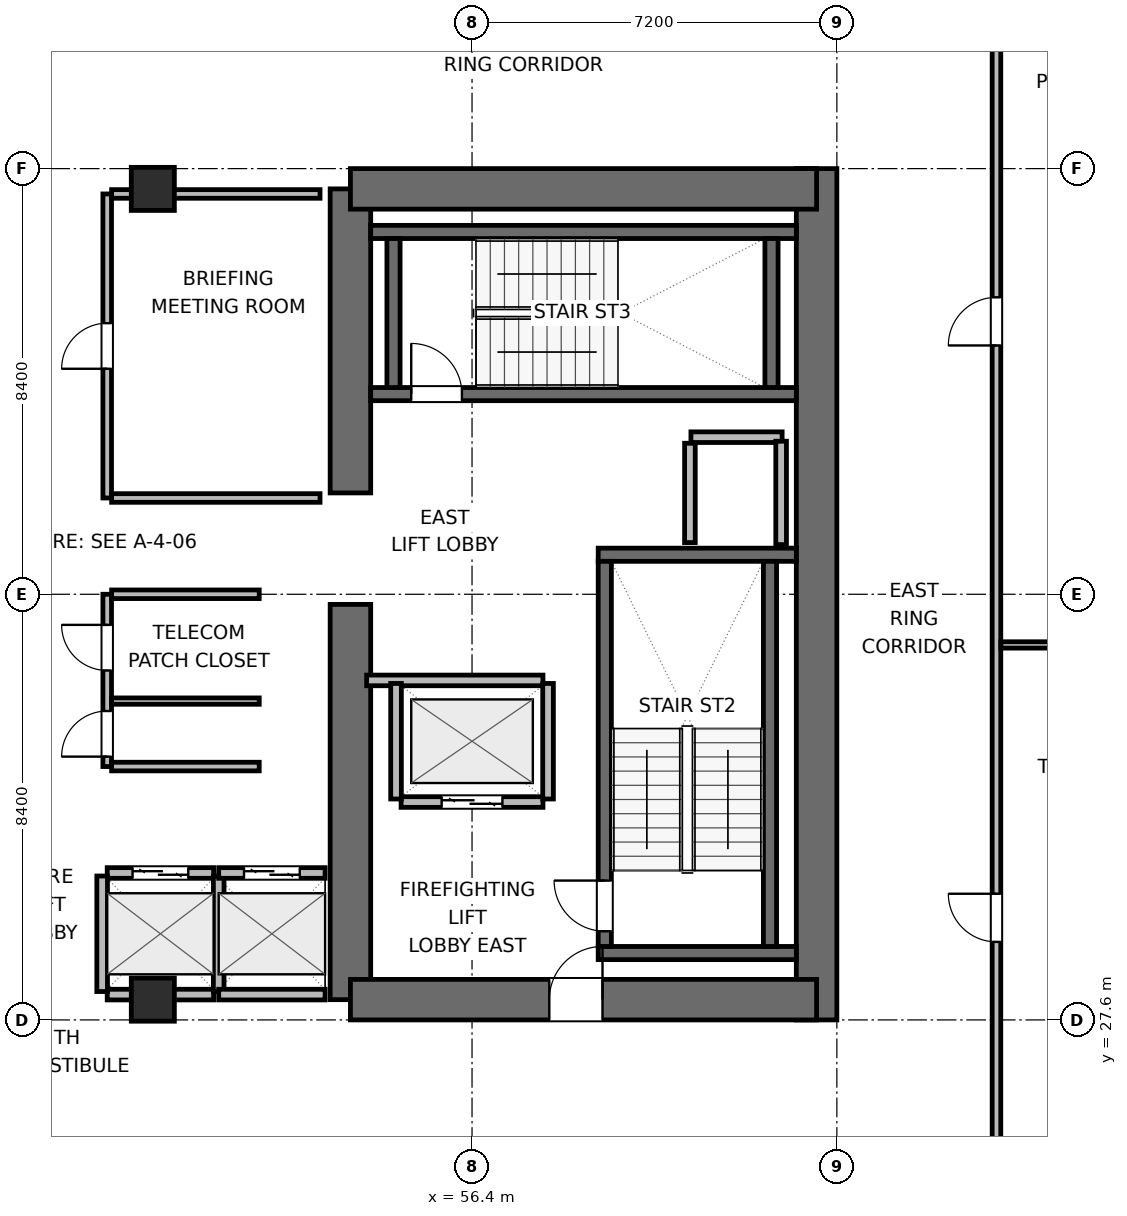
"""IFC4 building model, lengths in metres.
Left out: names, types, materials, properties, quantities, classifications, styles, units other than length and angle.
Written with IfcOpenShell. Run it as: python <this file> out.ifc"""

import sys

from ifc_helpers import new_model, si_unit, direction, frame, frame_2d, origin, origin_2d, place, context, subcontext, project, spatial, rectangle, extrude, element, fill, save


model = new_model("IFC4")
c1 = context("Model", 3, precision=1e-05, world=origin(), true_north=direction((0.0, 1.0)))
c2 = subcontext(c1, "Body", "Model", "MODEL_VIEW")
j1 = project(units=[si_unit("LENGTHUNIT", "METRE"), si_unit("PLANEANGLEUNIT", "RADIAN")], contexts=[c1])
p1 = place(None, origin())
s1 = spatial("IfcSite", under=j1, at=p1, CompositionType="ELEMENT")
p2 = place(p1, origin())
s2 = spatial("IfcBuilding", under=s1, at=p2, CompositionType="ELEMENT")
p3 = place(p2, frame((0.0, 0.0, 93.6)))
s3 = spatial("IfcBuildingStorey", under=s2, at=p3, CompositionType="ELEMENT", Elevation=93.6)
p4 = place(p3, frame((54.0, 28.0, 0.0), z_axis=(0.0, 0.0, 1.0), x_axis=(0.0, 1.0, 0.0)))
e1 = element("IfcWall", 1, at=p4, inside=s3, PredefinedType="SHEAR", context=c2, shape_type="SweptSolid", body=[
    extrude(rectangle(XDim=7.8, YDim=0.8, at=frame_2d((3.9, 0.0))), origin(), (0.0, 0.0, 1.0), 3.9),
])
p5 = place(p3, frame((54.0, 38.0, 0.0), z_axis=(0.0, 0.0, 1.0), x_axis=(0.0, 1.0, 0.0)))
e2 = element("IfcWall", 2, at=p5, inside=s3, PredefinedType="SHEAR", context=c2, shape_type="SweptSolid", body=[
    extrude(rectangle(XDim=6.0, YDim=0.8, at=frame_2d((3.0, 0.0))), origin(), (0.0, 0.0, 1.0), 3.9),
])
p6 = place(p3, frame((63.2, 27.6, 0.0), z_axis=(0.0, 0.0, 1.0), x_axis=(0.0, 1.0, 0.0)))
e3 = element("IfcWall", 3, at=p6, inside=s3, PredefinedType="SHEAR", context=c2, shape_type="SweptSolid", body=[
    extrude(rectangle(XDim=16.8, YDim=0.8, at=frame_2d((8.4, 0.0))), origin(), (0.0, 0.0, 1.0), 3.9),
])
p7 = place(p3, frame((54.0, 28.0, 0.0), z_axis=(0.0, 0.0, 1.0), x_axis=(1.0, 0.0, 0.0)))
e4 = element("IfcWall", 4, at=p7, inside=s3, PredefinedType="SHEAR", context=c2, shape_type="SweptSolid", body=[
    extrude(rectangle(XDim=9.2, YDim=0.8, at=frame_2d((4.6, 0.0))), origin(), (0.0, 0.0, 1.0), 3.9),
])
p8 = place(p7, frame((3.925, 0.0, 0.0)))
e5 = element("IfcOpeningElement", 5, at=p8, cuts=e4, PredefinedType="OPENING", context=c2, shape_type="SweptSolid", body=[
    extrude(rectangle(XDim=1.05, YDim=2.04, at=frame_2d((0.525, 1.02))), frame((0.0, 0.41, 0.0), z_axis=(0.0, -1.0, 0.0), x_axis=(1.0, 0.0, 0.0)), (0.0, 0.0, 1.0), 0.82),
])
p9 = place(p3, frame((54.0, 44.0, 0.0), z_axis=(0.0, 0.0, 1.0), x_axis=(1.0, 0.0, 0.0)))
e6 = element("IfcWall", 6, at=p9, inside=s3, PredefinedType="SHEAR", context=c2, shape_type="SweptSolid", body=[
    extrude(rectangle(XDim=9.2, YDim=0.8, at=frame_2d((4.6, 0.0))), origin(), (0.0, 0.0, 1.0), 3.9),
])
for number, where, z_axis, x_axis in (
    (7, (58.89, 28.92, 0.0), (0.0, 0.0, 1.0), (1.0, 0.0, 0.0)),
    (8, (58.89, 36.78, 0.0), (0.0, 0.0, 1.0), (1.0, 0.0, 0.0)),
):
    element("IfcWall", number, at=place(p3, frame(where, z_axis=z_axis, x_axis=x_axis)), inside=s3, PredefinedType="SHEAR", context=c2, shape_type="SweptSolid", body=[
        extrude(rectangle(XDim=3.91, YDim=0.26, at=frame_2d((1.955, 0.0))), origin(), (0.0, 0.0, 1.0), 3.9),
    ])
p10 = place(p3, frame((59.02, 29.05, 0.0), z_axis=(0.0, 0.0, 1.0), x_axis=(0.0, 1.0, 0.0)))
e9 = element("IfcWall", 9, at=p10, inside=s3, PredefinedType="SHEAR", context=c2, shape_type="SweptSolid", body=[
    extrude(rectangle(XDim=7.6, YDim=0.26, at=frame_2d((3.8, 0.0))), origin(), (0.0, 0.0, 1.0), 3.9),
])
p11 = place(p10, frame((0.3, 0.0, 0.0)))
e10 = element("IfcOpeningElement", 10, at=p11, cuts=e9, PredefinedType="OPENING", context=c2, shape_type="SweptSolid", body=[
    extrude(rectangle(XDim=1.0, YDim=2.04, at=frame_2d((0.5, 1.02))), frame((0.0, 0.14, 0.0), z_axis=(0.0, -1.0, 0.0), x_axis=(1.0, 0.0, 0.0)), (0.0, 0.0, 1.0), 0.28),
])
p12 = place(p3, frame((62.28, 29.05, 0.0), z_axis=(0.0, 0.0, 1.0), x_axis=(0.0, 1.0, 0.0)))
e11 = element("IfcWall", 11, at=p12, inside=s3, PredefinedType="SHEAR", context=c2, shape_type="SweptSolid", body=[
    extrude(rectangle(XDim=7.6, YDim=0.26, at=frame_2d((3.8, 0.0))), origin(), (0.0, 0.0, 1.0), 3.9),
])
p13 = place(p3, frame((54.4, 39.95, 0.0), z_axis=(0.0, 0.0, 1.0), x_axis=(1.0, 0.0, 0.0)))
e12 = element("IfcWall", 12, at=p13, inside=s3, PredefinedType="SHEAR", context=c2, shape_type="SweptSolid", body=[
    extrude(rectangle(XDim=8.4, YDim=0.26, at=frame_2d((4.2, 0.0))), origin(), (0.0, 0.0, 1.0), 3.9),
])
p14 = place(p13, frame((0.8, 0.0, 0.0)))
e13 = element("IfcOpeningElement", 13, at=p14, cuts=e12, PredefinedType="OPENING", context=c2, shape_type="SweptSolid", body=[
    extrude(rectangle(XDim=1.0, YDim=2.04, at=frame_2d((0.5, 1.02))), frame((0.0, 0.14, 0.0), z_axis=(0.0, -1.0, 0.0), x_axis=(1.0, 0.0, 0.0)), (0.0, 0.0, 1.0), 0.28),
])
p15 = place(p3, frame((54.4, 43.15, 0.0), z_axis=(0.0, 0.0, 1.0), x_axis=(1.0, 0.0, 0.0)))
e14 = element("IfcWall", 14, at=p15, inside=s3, PredefinedType="SHEAR", context=c2, shape_type="SweptSolid", body=[
    extrude(rectangle(XDim=8.4, YDim=0.26, at=frame_2d((4.2, 0.0))), origin(), (0.0, 0.0, 1.0), 3.9),
])
for number, where, z_axis, x_axis in (
    (15, (54.85, 40.08, 0.0), (0.0, 0.0, 1.0), (0.0, 1.0, 0.0)),
    (16, (62.31, 40.08, 0.0), (0.0, 0.0, 1.0), (0.0, 1.0, 0.0)),
):
    element("IfcWall", number, at=place(p3, frame(where, z_axis=z_axis, x_axis=x_axis)), inside=s3, PredefinedType="SHEAR", context=c2, shape_type="SweptSolid", body=[
        extrude(rectangle(XDim=2.94, YDim=0.26, at=frame_2d((1.47, 0.0))), origin(), (0.0, 0.0, 1.0), 3.9),
    ])
for number, where, z_axis, x_axis in (
    (17, (50.1, 28.0, 0.0), (0.0, 0.0, 1.0), (1.0, 0.0, 0.0)),
    (18, (50.1, 44.0, 0.0), (0.0, 0.0, 1.0), (1.0, 0.0, 0.0)),
):
    element("IfcColumn", number, at=place(p3, frame(where, z_axis=z_axis, x_axis=x_axis)), inside=s3, PredefinedType="COLUMN", context=c2, shape_type="SweptSolid", body=[
        extrude(rectangle(XDim=0.85, YDim=0.85, at=origin_2d()), origin(), (0.0, 0.0, 1.0), 3.9),
    ])
p16 = place(p3, frame((60.72, 39.1, 0.0), z_axis=(0.0, 0.0, 1.0), x_axis=(1.0, 0.0, 0.0)))
e19 = element("IfcWall", 19, at=p16, inside=s3, PredefinedType="PARTITIONING", context=c2, shape_type="SweptSolid", body=[
    extrude(rectangle(XDim=1.8, YDim=0.21, at=frame_2d((0.9, 0.0))), origin(), (0.0, 0.0, 1.0), 3.64),
])
p17 = place(p3, frame((60.7, 37.02, 0.0), z_axis=(0.0, 0.0, 1.0), x_axis=(0.0, 1.0, 0.0)))
e20 = element("IfcWall", 20, at=p17, inside=s3, PredefinedType="PARTITIONING", context=c2, shape_type="SweptSolid", body=[
    extrude(rectangle(XDim=1.96, YDim=0.21, at=frame_2d((0.98, 0.0))), origin(), (0.0, 0.0, 1.0), 3.64),
])
p18 = place(p3, frame((62.5, 36.98, 0.0), z_axis=(0.0, 0.0, 1.0), x_axis=(0.0, 1.0, 0.0)))
e21 = element("IfcWall", 21, at=p18, inside=s3, PredefinedType="PARTITIONING", context=c2, shape_type="SweptSolid", body=[
    extrude(rectangle(XDim=2.04, YDim=0.21, at=frame_2d((1.02, 0.0))), origin(), (0.0, 0.0, 1.0), 3.64),
])
p19 = place(p3, frame((55.0, 31.9, 0.0), z_axis=(0.0, 0.0, 1.0), x_axis=(1.0, 0.0, 0.0)))
e22 = element("IfcWall", 22, at=p19, inside=s3, PredefinedType="PARTITIONING", context=c2, shape_type="SweptSolid", body=[
    extrude(rectangle(XDim=2.8, YDim=0.21, at=frame_2d((1.4, 0.0))), origin(), (0.0, 0.0, 1.0), 3.64),
])
p20 = place(p19, frame((0.8, 0.0, 0.0)))
e23 = element("IfcOpeningElement", 23, at=p20, cuts=e22, PredefinedType="OPENING", context=c2, shape_type="SweptSolid", body=[
    extrude(rectangle(XDim=1.2, YDim=2.04, at=frame_2d((0.6, 1.02))), frame((0.0, 0.115, 0.0), z_axis=(0.0, -1.0, 0.0), x_axis=(1.0, 0.0, 0.0)), (0.0, 0.0, 1.0), 0.23),
])
p21 = place(p3, frame((54.32, 34.3, 0.0), z_axis=(0.0, 0.0, 1.0), x_axis=(1.0, 0.0, 0.0)))
e24 = element("IfcWall", 24, at=p21, inside=s3, PredefinedType="PARTITIONING", context=c2, shape_type="SweptSolid", body=[
    extrude(rectangle(XDim=3.48, YDim=0.21, at=frame_2d((1.74, 0.0))), origin(), (0.0, 0.0, 1.0), 3.64),
])
for number, where, z_axis, x_axis in (
    (25, (54.9, 31.96, 0.0), (0.0, 0.0, 1.0), (0.0, 1.0, 0.0)),
    (26, (57.9, 31.96, 0.0), (0.0, 0.0, 1.0), (0.0, 1.0, 0.0)),
):
    element("IfcWall", number, at=place(p3, frame(where, z_axis=z_axis, x_axis=x_axis)), inside=s3, PredefinedType="PARTITIONING", context=c2, shape_type="SweptSolid", body=[
        extrude(rectangle(XDim=2.28, YDim=0.21, at=frame_2d((1.14, 0.0))), origin(), (0.0, 0.0, 1.0), 3.64),
    ])
p22 = place(p3, frame((49.2, 30.5, 0.0), z_axis=(0.0, 0.0, 1.0), x_axis=(1.0, 0.0, 0.0)))
e27 = element("IfcWall", 27, at=p22, inside=s3, PredefinedType="PARTITIONING", context=c2, shape_type="SweptSolid", body=[
    extrude(rectangle(XDim=2.1, YDim=0.21, at=frame_2d((1.05, 0.0))), origin(), (0.0, 0.0, 1.0), 3.64),
])
p23 = place(p22, frame((0.5, 0.0, 0.0)))
e28 = element("IfcOpeningElement", 28, at=p23, cuts=e27, PredefinedType="OPENING", context=c2, shape_type="SweptSolid", body=[
    extrude(rectangle(XDim=1.1, YDim=2.04, at=frame_2d((0.55, 1.02))), frame((0.0, 0.115, 0.0), z_axis=(0.0, -1.0, 0.0), x_axis=(1.0, 0.0, 0.0)), (0.0, 0.0, 1.0), 0.23),
])
p24 = place(p3, frame((49.2, 28.1, 0.0), z_axis=(0.0, 0.0, 1.0), x_axis=(1.0, 0.0, 0.0)))
e29 = element("IfcWall", 29, at=p24, inside=s3, PredefinedType="PARTITIONING", context=c2, shape_type="SweptSolid", body=[
    extrude(rectangle(XDim=2.1, YDim=0.21, at=frame_2d((1.05, 0.0))), origin(), (0.0, 0.0, 1.0), 2.525),
])
for number, where, z_axis, x_axis in (
    (30, (49.1, 28.16, 0.0), (0.0, 0.0, 1.0), (0.0, 1.0, 0.0)),
    (31, (51.4, 28.16, 0.0), (0.0, 0.0, 1.0), (0.0, 1.0, 0.0)),
):
    element("IfcWall", number, at=place(p3, frame(where, z_axis=z_axis, x_axis=x_axis)), inside=s3, PredefinedType="PARTITIONING", context=c2, shape_type="SweptSolid", body=[
        extrude(rectangle(XDim=2.28, YDim=0.21, at=frame_2d((1.14, 0.0))), origin(), (0.0, 0.0, 1.0), 3.64),
    ])
p25 = place(p3, frame((51.4, 30.5, 0.0), z_axis=(0.0, 0.0, 1.0), x_axis=(1.0, 0.0, 0.0)))
e32 = element("IfcWall", 32, at=p25, inside=s3, PredefinedType="PARTITIONING", context=c2, shape_type="SweptSolid", body=[
    extrude(rectangle(XDim=2.1, YDim=0.21, at=frame_2d((1.05, 0.0))), origin(), (0.0, 0.0, 1.0), 3.64),
])
p26 = place(p25, frame((0.5, 0.0, 0.0)))
e33 = element("IfcOpeningElement", 33, at=p26, cuts=e32, PredefinedType="OPENING", context=c2, shape_type="SweptSolid", body=[
    extrude(rectangle(XDim=1.1, YDim=2.04, at=frame_2d((0.55, 1.02))), frame((0.0, 0.115, 0.0), z_axis=(0.0, -1.0, 0.0), x_axis=(1.0, 0.0, 0.0)), (0.0, 0.0, 1.0), 0.23),
])
p27 = place(p3, frame((51.4, 28.1, 0.0), z_axis=(0.0, 0.0, 1.0), x_axis=(1.0, 0.0, 0.0)))
e34 = element("IfcWall", 34, at=p27, inside=s3, PredefinedType="PARTITIONING", context=c2, shape_type="SweptSolid", body=[
    extrude(rectangle(XDim=2.1, YDim=0.21, at=frame_2d((1.05, 0.0))), origin(), (0.0, 0.0, 1.0), 2.525),
])
p28 = place(p3, frame((49.2, 32.6, 0.0), z_axis=(0.0, 0.0, 1.0), x_axis=(0.0, 1.0, 0.0)))
e35 = element("IfcWall", 35, at=p28, inside=s3, PredefinedType="PARTITIONING", context=c2, shape_type="SweptSolid", body=[
    extrude(rectangle(XDim=3.4, YDim=0.17, at=frame_2d((1.7, 0.0))), origin(), (0.0, 0.0, 1.0), 3.64),
])
p29 = place(p28, frame((0.196, 0.0, 0.0)))
e36 = element("IfcOpeningElement", 36, at=p29, cuts=e35, PredefinedType="OPENING", context=c2, shape_type="SweptSolid", body=[
    extrude(rectangle(XDim=0.9, YDim=2.02, at=frame_2d((0.45, 1.01))), frame((0.0, 0.095, 0.0), z_axis=(0.0, -1.0, 0.0), x_axis=(1.0, 0.0, 0.0)), (0.0, 0.0, 1.0), 0.19),
])
p30 = place(p28, frame((1.896, 0.0, 0.0)))
e37 = element("IfcOpeningElement", 37, at=p30, cuts=e35, PredefinedType="OPENING", context=c2, shape_type="SweptSolid", body=[
    extrude(rectangle(XDim=0.9, YDim=2.02, at=frame_2d((0.45, 1.01))), frame((0.0, 0.095, 0.0), z_axis=(0.0, -1.0, 0.0), x_axis=(1.0, 0.0, 0.0)), (0.0, 0.0, 1.0), 0.19),
])
for number, where, z_axis, x_axis in (
    (38, (49.287, 32.6, 0.0), (0.0, 0.0, 1.0), (1.0, 0.0, 0.0)),
    (39, (49.287, 36.0, 0.0), (0.0, 0.0, 1.0), (1.0, 0.0, 0.0)),
):
    element("IfcWall", number, at=place(p3, frame(where, z_axis=z_axis, x_axis=x_axis)), inside=s3, PredefinedType="PARTITIONING", context=c2, shape_type="SweptSolid", body=[
        extrude(rectangle(XDim=2.913, YDim=0.17, at=frame_2d((1.457, 0.0))), origin(), (0.0, 0.0, 1.0), 3.64),
    ])
p31 = place(p3, frame((49.287, 33.892, 0.0), z_axis=(0.0, 0.0, 1.0), x_axis=(1.0, 0.0, 0.0)))
e40 = element("IfcWall", 40, at=p31, inside=s3, PredefinedType="PARTITIONING", context=c2, shape_type="SweptSolid", body=[
    extrude(rectangle(XDim=2.913, YDim=0.125, at=frame_2d((1.457, 0.0))), origin(), (0.0, 0.0, 1.0), 3.64),
])
p32 = place(p3, frame((49.2, 37.9, 0.0), z_axis=(0.0, 0.0, 1.0), x_axis=(0.0, 1.0, 0.0)))
e41 = element("IfcWall", 41, at=p32, inside=s3, PredefinedType="PARTITIONING", context=c2, shape_type="SweptSolid", body=[
    extrude(rectangle(XDim=6.0, YDim=0.17, at=frame_2d((3.0, 0.0))), origin(), (0.0, 0.0, 1.0), 3.64),
])
p33 = place(p32, frame((2.55, 0.0, 0.0)))
e42 = element("IfcOpeningElement", 42, at=p33, cuts=e41, PredefinedType="OPENING", context=c2, shape_type="SweptSolid", body=[
    extrude(rectangle(XDim=0.9, YDim=2.02, at=frame_2d((0.45, 1.01))), frame((0.0, 0.095, 0.0), z_axis=(0.0, -1.0, 0.0), x_axis=(1.0, 0.0, 0.0)), (0.0, 0.0, 1.0), 0.19),
])
p34 = place(p3, frame((49.287, 37.9, 0.0), z_axis=(0.0, 0.0, 1.0), x_axis=(1.0, 0.0, 0.0)))
e43 = element("IfcWall", 43, at=p34, inside=s3, PredefinedType="PARTITIONING", context=c2, shape_type="SweptSolid", body=[
    extrude(rectangle(XDim=4.113, YDim=0.17, at=frame_2d((2.056, 0.0))), origin(), (0.0, 0.0, 1.0), 3.64),
])
p35 = place(p3, frame((49.287, 43.9, 0.0), z_axis=(0.0, 0.0, 1.0), x_axis=(1.0, 0.0, 0.0)))
e44 = element("IfcWall", 44, at=p35, inside=s3, PredefinedType="PARTITIONING", context=c2, shape_type="SweptSolid", body=[
    extrude(rectangle(XDim=4.113, YDim=0.17, at=frame_2d((2.056, 0.0))), origin(), (0.0, 0.0, 1.0), 2.525),
])
p36 = place(p3, frame((66.75, 24.317, 0.0), z_axis=(0.0, 0.0, 1.0), x_axis=(0.0, 1.0, 0.0)))
e45 = element("IfcWall", 45, at=p36, inside=s3, PredefinedType="PARTITIONING", context=c2, shape_type="SweptSolid", body=[
    extrude(rectangle(XDim=23.366, YDim=0.17, at=frame_2d((11.683, 0.0))), origin(), (0.0, 0.0, 1.0), 3.64),
])
p37 = place(p36, frame((4.823, 0.0, 0.0)))
e46 = element("IfcOpeningElement", 46, at=p37, cuts=e45, PredefinedType="OPENING", context=c2, shape_type="SweptSolid", body=[
    extrude(rectangle(XDim=0.95, YDim=2.04, at=frame_2d((0.475, 1.02))), frame((0.0, 0.095, 0.0), z_axis=(0.0, -1.0, 0.0), x_axis=(1.0, 0.0, 0.0)), (0.0, 0.0, 1.0), 0.19),
])
p38 = place(p36, frame((16.593, 0.0, 0.0)))
e47 = element("IfcOpeningElement", 47, at=p38, cuts=e45, PredefinedType="OPENING", context=c2, shape_type="SweptSolid", body=[
    extrude(rectangle(XDim=0.95, YDim=2.04, at=frame_2d((0.475, 1.02))), frame((0.0, 0.095, 0.0), z_axis=(0.0, -1.0, 0.0), x_axis=(1.0, 0.0, 0.0)), (0.0, 0.0, 1.0), 0.19),
])
p39 = place(p3, frame((66.837, 35.0, 0.0), z_axis=(0.0, 0.0, 1.0), x_axis=(1.0, 0.0, 0.0)))
e48 = element("IfcWall", 48, at=p39, inside=s3, PredefinedType="PARTITIONING", context=c2, shape_type="SweptSolid", body=[
    extrude(rectangle(XDim=3.718, YDim=0.125, at=frame_2d((1.859, 0.0))), origin(), (0.0, 0.0, 1.0), 3.64),
])
p40 = place(p11, origin())
e49 = element("IfcDoor", 49, at=p40, inside=s3, OperationType="SINGLE_SWING_RIGHT", PredefinedType="DOOR", context=c2, shape_type="SweptSolid", body=[
    extrude(rectangle(XDim=1.0, YDim=2.04, at=frame_2d((0.5, 1.02))), frame((0.0, 0.025, 0.0), z_axis=(0.0, -1.0, 0.0), x_axis=(1.0, 0.0, 0.0)), (0.0, 0.0, 1.0), 0.05),
])
fill(e10, e49)
p41 = place(p14, origin())
e50 = element("IfcDoor", 50, at=p41, inside=s3, OperationType="SINGLE_SWING_LEFT", PredefinedType="DOOR", context=c2, shape_type="SweptSolid", body=[
    extrude(rectangle(XDim=1.0, YDim=2.04, at=frame_2d((0.5, 1.02))), frame((0.0, 0.025, 0.0), z_axis=(0.0, -1.0, 0.0), x_axis=(1.0, 0.0, 0.0)), (0.0, 0.0, 1.0), 0.05),
])
fill(e13, e50)
p42 = place(p20, origin())
e51 = element("IfcDoor", 51, at=p42, inside=s3, OperationType="DOUBLE_DOOR_SLIDING", PredefinedType="DOOR", context=c2, shape_type="SweptSolid", body=[
    extrude(rectangle(XDim=1.2, YDim=2.04, at=frame_2d((0.6, 1.02))), frame((0.0, 0.025, 0.0), z_axis=(0.0, -1.0, 0.0), x_axis=(1.0, 0.0, 0.0)), (0.0, 0.0, 1.0), 0.05),
])
fill(e23, e51)
p43 = place(p23, origin())
e52 = element("IfcDoor", 52, at=p43, inside=s3, OperationType="DOUBLE_DOOR_SLIDING", PredefinedType="DOOR", context=c2, shape_type="SweptSolid", body=[
    extrude(rectangle(XDim=1.1, YDim=2.04, at=frame_2d((0.55, 1.02))), frame((0.0, 0.025, 0.0), z_axis=(0.0, -1.0, 0.0), x_axis=(1.0, 0.0, 0.0)), (0.0, 0.0, 1.0), 0.05),
])
fill(e28, e52)
p44 = place(p26, origin())
e53 = element("IfcDoor", 53, at=p44, inside=s3, OperationType="DOUBLE_DOOR_SLIDING", PredefinedType="DOOR", context=c2, shape_type="SweptSolid", body=[
    extrude(rectangle(XDim=1.1, YDim=2.04, at=frame_2d((0.55, 1.02))), frame((0.0, 0.025, 0.0), z_axis=(0.0, -1.0, 0.0), x_axis=(1.0, 0.0, 0.0)), (0.0, 0.0, 1.0), 0.05),
])
fill(e33, e53)
p45 = place(p8, origin())
e54 = element("IfcDoor", 54, at=p45, inside=s3, OperationType="SINGLE_SWING_RIGHT", PredefinedType="DOOR", context=c2, shape_type="SweptSolid", body=[
    extrude(rectangle(XDim=1.05, YDim=2.04, at=frame_2d((0.525, 1.02))), frame((0.0, 0.025, 0.0), z_axis=(0.0, -1.0, 0.0), x_axis=(1.0, 0.0, 0.0)), (0.0, 0.0, 1.0), 0.05),
])
fill(e5, e54)
p46 = place(p29, origin())
e55 = element("IfcDoor", 55, at=p46, inside=s3, OperationType="SINGLE_SWING_LEFT", PredefinedType="DOOR", context=c2, shape_type="SweptSolid", body=[
    extrude(rectangle(XDim=0.9, YDim=2.02, at=frame_2d((0.45, 1.01))), frame((0.0, 0.025, 0.0), z_axis=(0.0, -1.0, 0.0), x_axis=(1.0, 0.0, 0.0)), (0.0, 0.0, 1.0), 0.05),
])
fill(e36, e55)
p47 = place(p30, origin())
e56 = element("IfcDoor", 56, at=p47, inside=s3, OperationType="SINGLE_SWING_RIGHT", PredefinedType="DOOR", context=c2, shape_type="SweptSolid", body=[
    extrude(rectangle(XDim=0.9, YDim=2.02, at=frame_2d((0.45, 1.01))), frame((0.0, 0.025, 0.0), z_axis=(0.0, -1.0, 0.0), x_axis=(1.0, 0.0, 0.0)), (0.0, 0.0, 1.0), 0.05),
])
fill(e37, e56)
p48 = place(p33, origin())
e57 = element("IfcDoor", 57, at=p48, inside=s3, OperationType="SINGLE_SWING_LEFT", PredefinedType="DOOR", context=c2, shape_type="SweptSolid", body=[
    extrude(rectangle(XDim=0.9, YDim=2.02, at=frame_2d((0.45, 1.01))), frame((0.0, 0.025, 0.0), z_axis=(0.0, -1.0, 0.0), x_axis=(1.0, 0.0, 0.0)), (0.0, 0.0, 1.0), 0.05),
])
fill(e42, e57)
p49 = place(p37, origin())
e58 = element("IfcDoor", 58, at=p49, inside=s3, OperationType="SINGLE_SWING_RIGHT", PredefinedType="DOOR", context=c2, shape_type="SweptSolid", body=[
    extrude(rectangle(XDim=0.95, YDim=2.04, at=frame_2d((0.475, 1.02))), frame((0.0, 0.025, 0.0), z_axis=(0.0, -1.0, 0.0), x_axis=(1.0, 0.0, 0.0)), (0.0, 0.0, 1.0), 0.05),
])
fill(e46, e58)
p50 = place(p38, origin())
e59 = element("IfcDoor", 59, at=p50, inside=s3, OperationType="SINGLE_SWING_LEFT", PredefinedType="DOOR", context=c2, shape_type="SweptSolid", body=[
    extrude(rectangle(XDim=0.95, YDim=2.04, at=frame_2d((0.475, 1.02))), frame((0.0, 0.025, 0.0), z_axis=(0.0, -1.0, 0.0), x_axis=(1.0, 0.0, 0.0)), (0.0, 0.0, 1.0), 0.05),
])
fill(e47, e59)
save(model, sys.argv[1])
